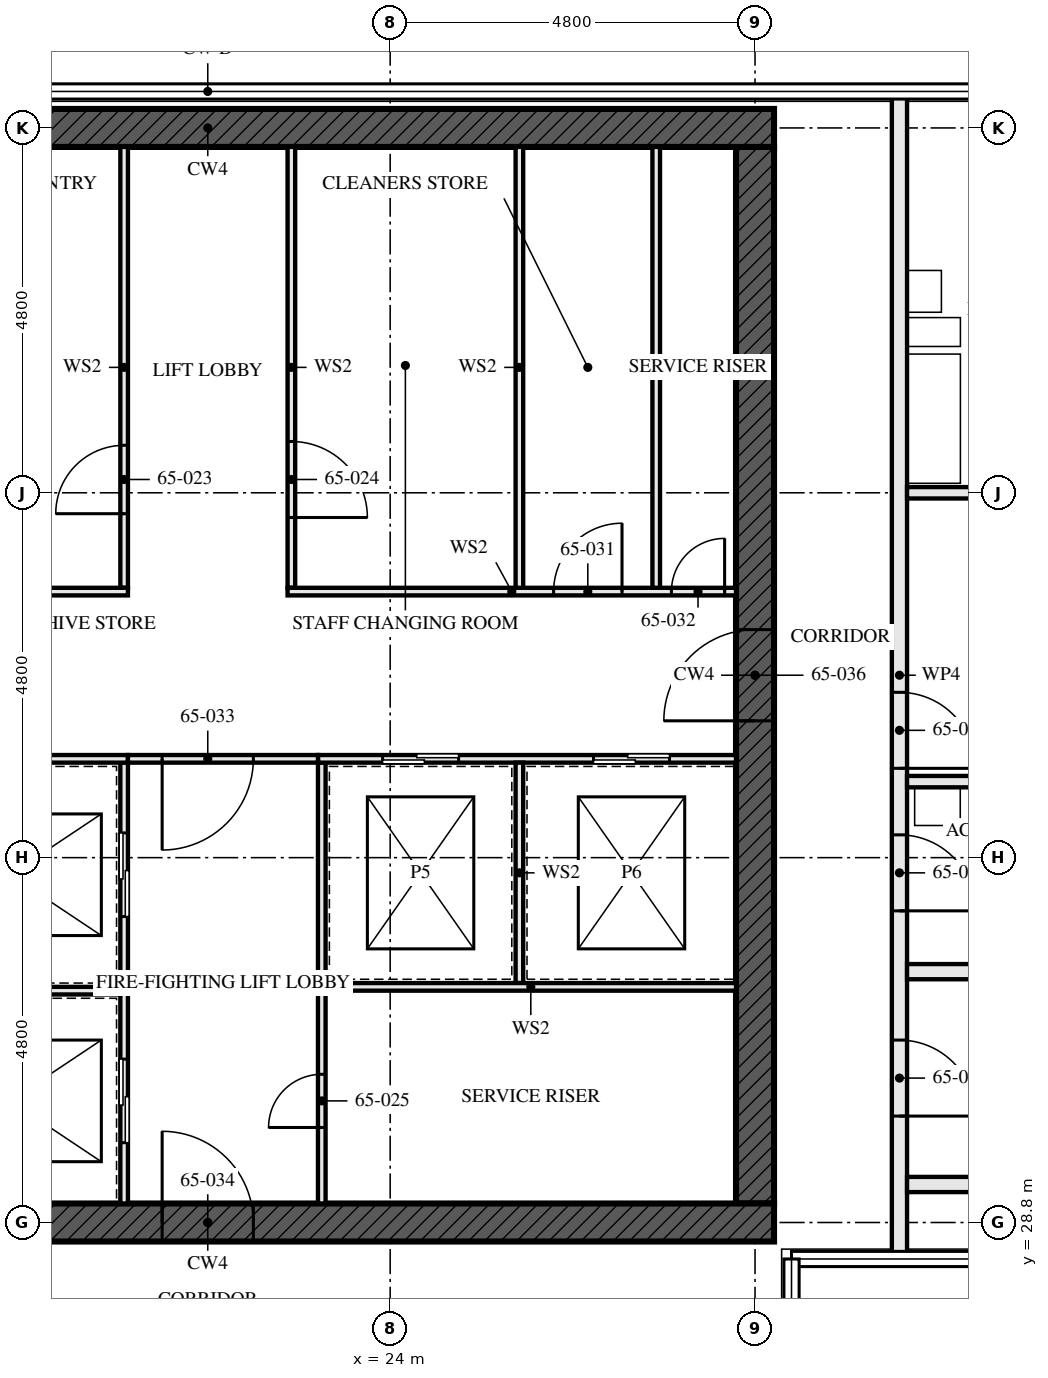
"""IFC4 building model, lengths in metres.
Left out: names, types, materials, properties, quantities, classifications, styles, units other than length and angle.
Written with IfcOpenShell. Run it as: python <this file> out.ifc"""

import sys

from ifc_helpers import new_model, si_unit, direction, frame, frame_2d, origin, place, context, subcontext, project, spatial, rectangle, extrude, element, fill, save


model = new_model("IFC4")
c1 = context("Model", 3, precision=1e-05, world=origin(), true_north=direction((0.0, 1.0)))
c2 = subcontext(c1, "Body", "Model", "MODEL_VIEW")
j1 = project(units=[si_unit("LENGTHUNIT", "METRE"), si_unit("PLANEANGLEUNIT", "RADIAN")], contexts=[c1])
p1 = place(None, origin())
s1 = spatial("IfcSite", under=j1, at=p1, CompositionType="ELEMENT")
p2 = place(p1, origin())
s2 = spatial("IfcBuilding", under=s1, at=p2, CompositionType="ELEMENT")
p3 = place(p2, frame((0.0, 0.0, 236.5)))
s3 = spatial("IfcBuildingStorey", under=s2, at=p3, CompositionType="ELEMENT", Elevation=236.5)
p4 = place(p3, frame((14.15, 28.8, -0.17), z_axis=(0.0, 0.0, 1.0), x_axis=(1.0, 0.0, 0.0)))
e1 = element("IfcWall", 1, at=p4, inside=s3, PredefinedType="SHEAR", context=c2, shape_type="SweptSolid", body=[
    extrude(rectangle(XDim=14.9, YDim=0.5, at=frame_2d((7.45, 0.0))), origin(), (0.0, 0.0, 1.0), 3.5),
])
p5 = place(p4, frame((6.85, 0.0, 0.17)))
e2 = element("IfcOpeningElement", 2, at=p5, cuts=e1, PredefinedType="OPENING", context=c2, shape_type="SweptSolid", body=[
    extrude(rectangle(XDim=1.2, YDim=2.1, at=frame_2d((0.6, 1.05))), frame((0.0, 0.26, 0.0), z_axis=(0.0, -1.0, 0.0), x_axis=(1.0, 0.0, 0.0)), (0.0, 0.0, 1.0), 0.521),
])
p6 = place(p3, frame((29.05, 43.2, -0.17), z_axis=(0.0, 0.0, 1.0), x_axis=(-1.0, 0.0, 0.0)))
e3 = element("IfcWall", 3, at=p6, inside=s3, PredefinedType="SHEAR", context=c2, shape_type="SweptSolid", body=[
    extrude(rectangle(XDim=14.9, YDim=0.5, at=frame_2d((7.45, 0.0))), origin(), (0.0, 0.0, 1.0), 3.5),
])
p7 = place(p3, frame((28.8, 29.05, -0.17), z_axis=(0.0, 0.0, 1.0), x_axis=(0.0, 1.0, 0.0)))
e4 = element("IfcWall", 4, at=p7, inside=s3, PredefinedType="SHEAR", context=c2, shape_type="SweptSolid", body=[
    extrude(rectangle(XDim=13.9, YDim=0.5, at=frame_2d((6.95, 0.0))), origin(), (0.0, 0.0, 1.0), 3.5),
])
p8 = place(p7, frame((6.35, 0.0, 0.17)))
e5 = element("IfcOpeningElement", 5, at=p8, cuts=e4, PredefinedType="OPENING", context=c2, shape_type="SweptSolid", body=[
    extrude(rectangle(XDim=1.2, YDim=2.1, at=frame_2d((0.6, 1.05))), frame((0.0, 0.26, 0.0), z_axis=(0.0, -1.0, 0.0), x_axis=(1.0, 0.0, 0.0)), (0.0, 0.0, 1.0), 0.521),
])
for number, where, z_axis, x_axis in (
    (6, (35.5, 29.3, 0.0), (0.0, 0.0, 1.0), (-1.0, 0.0, 0.0)),
    (7, (35.5, 32.1, 0.0), (0.0, 0.0, 1.0), (-1.0, 0.0, 0.0)),
):
    element("IfcWall", number, at=place(p3, frame(where, z_axis=z_axis, x_axis=x_axis)), inside=s3, PredefinedType="SOLIDWALL", context=c2, shape_type="SweptSolid", body=[
        extrude(rectangle(XDim=4.7, YDim=0.2, at=frame_2d((2.35, 0.0))), origin(), (0.0, 0.0, 1.0), 2.99),
    ])
p9 = place(p3, frame((33.8, 34.6, 0.0), z_axis=(0.0, 0.0, 1.0), x_axis=(-1.0, 0.0, 0.0)))
e8 = element("IfcWall", 8, at=p9, inside=s3, PredefinedType="PARTITIONING", context=c2, shape_type="SweptSolid", body=[
    extrude(rectangle(XDim=3.0, YDim=0.15, at=frame_2d((1.5, 0.0))), origin(), (0.0, 0.0, 1.0), 3.33),
])
p10 = place(p3, frame((33.8, 38.4, 0.0), z_axis=(0.0, 0.0, 1.0), x_axis=(-1.0, 0.0, 0.0)))
e9 = element("IfcWall", 9, at=p10, inside=s3, PredefinedType="PARTITIONING", context=c2, shape_type="SweptSolid", body=[
    extrude(rectangle(XDim=3.0, YDim=0.15, at=frame_2d((1.5, 0.0))), origin(), (0.0, 0.0, 1.0), 2.55),
])
p11 = place(p10, frame((1.05, 0.0, 0.0)))
e10 = element("IfcOpeningElement", 10, at=p11, cuts=e9, PredefinedType="OPENING", context=c2, shape_type="SweptSolid", body=[
    extrude(rectangle(XDim=0.9, YDim=2.1, at=frame_2d((0.45, 1.05))), frame((0.0, 0.085, 0.0), z_axis=(0.0, -1.0, 0.0), x_axis=(1.0, 0.0, 0.0)), (0.0, 0.0, 1.0), 0.171),
])
p12 = place(p3, frame((30.7, 28.345, 0.0), z_axis=(0.0, 0.0, 1.0), x_axis=(0.0, 1.0, 0.0)))
e11 = element("IfcWall", 11, at=p12, inside=s3, PredefinedType="PARTITIONING", context=c2, shape_type="SweptSolid", body=[
    extrude(rectangle(XDim=15.31, YDim=0.2, at=frame_2d((7.655, 0.0))), origin(), (0.0, 0.0, 1.0), 2.32),
])
p13 = place(p12, frame((1.855, 0.0, 0.0)))
e12 = element("IfcOpeningElement", 12, at=p13, cuts=e11, PredefinedType="OPENING", context=c2, shape_type="SweptSolid", body=[
    extrude(rectangle(XDim=1.0, YDim=2.1, at=frame_2d((0.5, 1.05))), frame((0.0, 0.111, 0.0), z_axis=(0.0, -1.0, 0.0), x_axis=(1.0, 0.0, 0.0)), (0.0, 0.0, 1.0), 0.221),
])
p14 = place(p12, frame((4.555, 0.0, 0.0)))
e13 = element("IfcOpeningElement", 13, at=p14, cuts=e11, PredefinedType="OPENING", context=c2, shape_type="SweptSolid", body=[
    extrude(rectangle(XDim=1.0, YDim=2.1, at=frame_2d((0.5, 1.05))), frame((0.0, 0.111, 0.0), z_axis=(0.0, -1.0, 0.0), x_axis=(1.0, 0.0, 0.0)), (0.0, 0.0, 1.0), 0.221),
])
p15 = place(p12, frame((6.43, 0.0, 0.0)))
e14 = element("IfcOpeningElement", 14, at=p15, cuts=e11, PredefinedType="OPENING", context=c2, shape_type="SweptSolid", body=[
    extrude(rectangle(XDim=1.0, YDim=2.1, at=frame_2d((0.5, 1.05))), frame((0.0, 0.111, 0.0), z_axis=(0.0, -1.0, 0.0), x_axis=(1.0, 0.0, 0.0)), (0.0, 0.0, 1.0), 0.221),
])
p16 = place(p3, frame((27.5, 37.15, 0.0), z_axis=(0.0, 0.0, 1.0), x_axis=(0.0, 1.0, 0.0)))
e15 = element("IfcWall", 15, at=p16, inside=s3, PredefinedType="SOLIDWALL", context=c2, shape_type="SweptSolid", body=[
    extrude(rectangle(XDim=5.8, YDim=0.1, at=frame_2d((2.9, 0.0))), origin(), (0.0, 0.0, 1.0), 3.33),
])
p17 = place(p3, frame((20.5, 29.05, 0.0), z_axis=(0.0, 0.0, 1.0), x_axis=(0.0, 1.0, 0.0)))
e16 = element("IfcWall", 16, at=p17, inside=s3, PredefinedType="SOLIDWALL", context=c2, shape_type="SweptSolid", body=[
    extrude(rectangle(XDim=5.8, YDim=0.1, at=frame_2d((2.9, 0.0))), origin(), (0.0, 0.0, 1.0), 3.33),
])
p18 = place(p17, frame((0.8, 0.0, 0.0)))
e17 = element("IfcOpeningElement", 17, at=p18, cuts=e16, PredefinedType="OPENING", context=c2, shape_type="SweptSolid", body=[
    extrude(rectangle(XDim=1.1, YDim=2.3, at=frame_2d((0.55, 1.15))), frame((0.0, 0.061, 0.0), z_axis=(0.0, -1.0, 0.0), x_axis=(1.0, 0.0, 0.0)), (0.0, 0.0, 1.0), 0.121),
])
p19 = place(p17, frame((3.775, 0.0, 0.0)))
e18 = element("IfcOpeningElement", 18, at=p19, cuts=e16, PredefinedType="OPENING", context=c2, shape_type="SweptSolid", body=[
    extrude(rectangle(XDim=1.1, YDim=2.3, at=frame_2d((0.55, 1.15))), frame((0.0, 0.061, 0.0), z_axis=(0.0, -1.0, 0.0), x_axis=(1.0, 0.0, 0.0)), (0.0, 0.0, 1.0), 0.121),
])
p20 = place(p3, frame((20.5, 37.15, 0.0), z_axis=(0.0, 0.0, 1.0), x_axis=(0.0, 1.0, 0.0)))
e19 = element("IfcWall", 19, at=p20, inside=s3, PredefinedType="SOLIDWALL", context=c2, shape_type="SweptSolid", body=[
    extrude(rectangle(XDim=5.8, YDim=0.1, at=frame_2d((2.9, 0.0))), origin(), (0.0, 0.0, 1.0), 3.33),
])
p21 = place(p20, frame((0.975, 0.0, 0.0)))
e20 = element("IfcOpeningElement", 20, at=p21, cuts=e19, PredefinedType="OPENING", context=c2, shape_type="SweptSolid", body=[
    extrude(rectangle(XDim=0.9, YDim=2.1, at=frame_2d((0.45, 1.05))), frame((0.0, 0.061, 0.0), z_axis=(0.0, -1.0, 0.0), x_axis=(1.0, 0.0, 0.0)), (0.0, 0.0, 1.0), 0.121),
])
p22 = place(p3, frame((22.7, 37.15, 0.0), z_axis=(0.0, 0.0, 1.0), x_axis=(0.0, 1.0, 0.0)))
e21 = element("IfcWall", 21, at=p22, inside=s3, PredefinedType="SOLIDWALL", context=c2, shape_type="SweptSolid", body=[
    extrude(rectangle(XDim=5.8, YDim=0.1, at=frame_2d((2.9, 0.0))), origin(), (0.0, 0.0, 1.0), 3.33),
])
p23 = place(p22, frame((0.925, 0.0, 0.0)))
e22 = element("IfcOpeningElement", 22, at=p23, cuts=e21, PredefinedType="OPENING", context=c2, shape_type="SweptSolid", body=[
    extrude(rectangle(XDim=1.0, YDim=2.1, at=frame_2d((0.5, 1.05))), frame((0.0, 0.061, 0.0), z_axis=(0.0, -1.0, 0.0), x_axis=(1.0, 0.0, 0.0)), (0.0, 0.0, 1.0), 0.121),
])
p24 = place(p3, frame((23.1, 29.05, 0.0), z_axis=(0.0, 0.0, 1.0), x_axis=(0.0, 1.0, 0.0)))
e23 = element("IfcWall", 23, at=p24, inside=s3, PredefinedType="SOLIDWALL", context=c2, shape_type="SweptSolid", body=[
    extrude(rectangle(XDim=5.8, YDim=0.1, at=frame_2d((2.9, 0.0))), origin(), (0.0, 0.0, 1.0), 3.33),
])
p25 = place(p24, frame((1.0, 0.0, 0.0)))
e24 = element("IfcOpeningElement", 24, at=p25, cuts=e23, PredefinedType="OPENING", context=c2, shape_type="SweptSolid", body=[
    extrude(rectangle(XDim=0.7, YDim=2.1, at=frame_2d((0.35, 1.05))), frame((0.0, 0.061, 0.0), z_axis=(0.0, -1.0, 0.0), x_axis=(1.0, 0.0, 0.0)), (0.0, 0.0, 1.0), 0.121),
])
p26 = place(p3, frame((14.65, 34.9, 0.0), z_axis=(0.0, 0.0, 1.0), x_axis=(1.0, 0.0, 0.0)))
e25 = element("IfcWall", 25, at=p26, inside=s3, PredefinedType="SOLIDWALL", context=c2, shape_type="SweptSolid", body=[
    extrude(rectangle(XDim=5.9, YDim=0.1, at=frame_2d((2.95, 0.0))), origin(), (0.0, 0.0, 1.0), 3.33),
])
p27 = place(p26, frame((1.6, 0.0, 0.0)))
e26 = element("IfcOpeningElement", 26, at=p27, cuts=e25, PredefinedType="OPENING", context=c2, shape_type="SweptSolid", body=[
    extrude(rectangle(XDim=0.7, YDim=2.1, at=frame_2d((0.35, 1.05))), frame((0.0, 0.061, 0.0), z_axis=(0.0, -1.0, 0.0), x_axis=(1.0, 0.0, 0.0)), (0.0, 0.0, 1.0), 0.121),
])
p28 = place(p3, frame((23.05, 34.9, 0.0), z_axis=(0.0, 0.0, 1.0), x_axis=(1.0, 0.0, 0.0)))
e27 = element("IfcWall", 27, at=p28, inside=s3, PredefinedType="SOLIDWALL", context=c2, shape_type="SweptSolid", body=[
    extrude(rectangle(XDim=5.5, YDim=0.1, at=frame_2d((2.75, 0.0))), origin(), (0.0, 0.0, 1.0), 3.33),
])
p29 = place(p28, frame((0.85, 0.0, 0.0)))
e28 = element("IfcOpeningElement", 28, at=p29, cuts=e27, PredefinedType="OPENING", context=c2, shape_type="SweptSolid", body=[
    extrude(rectangle(XDim=1.0, YDim=2.1, at=frame_2d((0.5, 1.05))), frame((0.0, 0.061, 0.0), z_axis=(0.0, -1.0, 0.0), x_axis=(1.0, 0.0, 0.0)), (0.0, 0.0, 1.0), 0.121),
])
p30 = place(p28, frame((3.625, 0.0, 0.0)))
e29 = element("IfcOpeningElement", 29, at=p30, cuts=e27, PredefinedType="OPENING", context=c2, shape_type="SweptSolid", body=[
    extrude(rectangle(XDim=1.0, YDim=2.1, at=frame_2d((0.5, 1.05))), frame((0.0, 0.061, 0.0), z_axis=(0.0, -1.0, 0.0), x_axis=(1.0, 0.0, 0.0)), (0.0, 0.0, 1.0), 0.121),
])
p31 = place(p3, frame((14.65, 37.1, 0.0), z_axis=(0.0, 0.0, 1.0), x_axis=(1.0, 0.0, 0.0)))
e30 = element("IfcWall", 30, at=p31, inside=s3, PredefinedType="SOLIDWALL", context=c2, shape_type="SweptSolid", body=[
    extrude(rectangle(XDim=5.9, YDim=0.1, at=frame_2d((2.95, 0.0))), origin(), (0.0, 0.0, 1.0), 3.33),
])
p32 = place(p31, frame((0.15, 0.0, 0.0)))
e31 = element("IfcOpeningElement", 31, at=p32, cuts=e30, PredefinedType="OPENING", context=c2, shape_type="SweptSolid", body=[
    extrude(rectangle(XDim=0.7, YDim=2.1, at=frame_2d((0.35, 1.05))), frame((0.0, 0.061, 0.0), z_axis=(0.0, -1.0, 0.0), x_axis=(1.0, 0.0, 0.0)), (0.0, 0.0, 1.0), 0.121),
])
p33 = place(p31, frame((1.5, 0.0, 0.0)))
e32 = element("IfcOpeningElement", 32, at=p33, cuts=e30, PredefinedType="OPENING", context=c2, shape_type="SweptSolid", body=[
    extrude(rectangle(XDim=0.9, YDim=2.1, at=frame_2d((0.45, 1.05))), frame((0.0, 0.061, 0.0), z_axis=(0.0, -1.0, 0.0), x_axis=(1.0, 0.0, 0.0)), (0.0, 0.0, 1.0), 0.121),
])
p34 = place(p3, frame((22.65, 37.1, 0.0), z_axis=(0.0, 0.0, 1.0), x_axis=(1.0, 0.0, 0.0)))
e33 = element("IfcWall", 33, at=p34, inside=s3, PredefinedType="SOLIDWALL", context=c2, shape_type="SweptSolid", body=[
    extrude(rectangle(XDim=5.9, YDim=0.1, at=frame_2d((2.95, 0.0))), origin(), (0.0, 0.0, 1.0), 3.33),
])
p35 = place(p34, frame((3.5, 0.0, 0.0)))
e34 = element("IfcOpeningElement", 34, at=p35, cuts=e33, PredefinedType="OPENING", context=c2, shape_type="SweptSolid", body=[
    extrude(rectangle(XDim=0.9, YDim=2.1, at=frame_2d((0.45, 1.05))), frame((0.0, 0.061, 0.0), z_axis=(0.0, -1.0, 0.0), x_axis=(1.0, 0.0, 0.0)), (0.0, 0.0, 1.0), 0.121),
])
p36 = place(p34, frame((5.05, 0.0, 0.0)))
e35 = element("IfcOpeningElement", 35, at=p36, cuts=e33, PredefinedType="OPENING", context=c2, shape_type="SweptSolid", body=[
    extrude(rectangle(XDim=0.7, YDim=2.1, at=frame_2d((0.35, 1.05))), frame((0.0, 0.061, 0.0), z_axis=(0.0, -1.0, 0.0), x_axis=(1.0, 0.0, 0.0)), (0.0, 0.0, 1.0), 0.121),
])
p37 = place(p3, frame((20.55, 34.9, 0.0), z_axis=(0.0, 0.0, 1.0), x_axis=(1.0, 0.0, 0.0)))
e36 = element("IfcWall", 36, at=p37, inside=s3, PredefinedType="SOLIDWALL", context=c2, shape_type="SweptSolid", body=[
    extrude(rectangle(XDim=2.5, YDim=0.1, at=frame_2d((1.25, 0.0))), origin(), (0.0, 0.0, 1.0), 3.33),
])
p38 = place(p37, frame((0.45, 0.0, 0.0)))
e37 = element("IfcOpeningElement", 37, at=p38, cuts=e36, PredefinedType="OPENING", context=c2, shape_type="SweptSolid", body=[
    extrude(rectangle(XDim=1.2, YDim=2.1, at=frame_2d((0.6, 1.05))), frame((0.0, 0.061, 0.0), z_axis=(0.0, -1.0, 0.0), x_axis=(1.0, 0.0, 0.0)), (0.0, 0.0, 1.0), 0.121),
])
p39 = place(p3, frame((17.55, 31.85, 0.0), z_axis=(0.0, 0.0, 1.0), x_axis=(1.0, 0.0, 0.0)))
e38 = element("IfcWall", 38, at=p39, inside=s3, PredefinedType="SOLIDWALL", context=c2, shape_type="SweptSolid", body=[
    extrude(rectangle(XDim=2.9, YDim=0.1, at=frame_2d((1.45, 0.0))), origin(), (0.0, 0.0, 1.0), 3.33),
])
p40 = place(p3, frame((25.7, 37.15, 0.0), z_axis=(0.0, 0.0, 1.0), x_axis=(0.0, 1.0, 0.0)))
e39 = element("IfcWall", 39, at=p40, inside=s3, PredefinedType="SOLIDWALL", context=c2, shape_type="SweptSolid", body=[
    extrude(rectangle(XDim=5.8, YDim=0.1, at=frame_2d((2.9, 0.0))), origin(), (0.0, 0.0, 1.0), 3.33),
])
p41 = place(p3, frame((25.7, 31.95, 0.0), z_axis=(0.0, 0.0, 1.0), x_axis=(0.0, 1.0, 0.0)))
e40 = element("IfcWall", 40, at=p41, inside=s3, PredefinedType="SOLIDWALL", context=c2, shape_type="SweptSolid", body=[
    extrude(rectangle(XDim=2.9, YDim=0.1, at=frame_2d((1.45, 0.0))), origin(), (0.0, 0.0, 1.0), 3.33),
])
p42 = place(p3, frame((23.15, 31.9, 0.0), z_axis=(0.0, 0.0, 1.0), x_axis=(1.0, 0.0, 0.0)))
e41 = element("IfcWall", 41, at=p42, inside=s3, PredefinedType="SOLIDWALL", context=c2, shape_type="SweptSolid", body=[
    extrude(rectangle(XDim=5.4, YDim=0.1, at=frame_2d((2.7, 0.0))), origin(), (0.0, 0.0, 1.0), 3.33),
])
p43 = place(p13, frame((1.0, 0.0, 0.0), z_axis=(0.0, 0.0, 1.0), x_axis=(-1.0, 0.0, 0.0)))
e42 = element("IfcDoor", 42, at=p43, inside=s3, OperationType="SINGLE_SWING_LEFT", PredefinedType="DOOR", context=c2, shape_type="SweptSolid", body=[
    extrude(rectangle(XDim=1.0, YDim=2.1, at=frame_2d((0.5, 1.05))), frame((0.0, 0.032, 0.0), z_axis=(0.0, -1.0, 0.0), x_axis=(1.0, 0.0, 0.0)), (0.0, 0.0, 1.0), 0.064),
])
fill(e12, e42)
p44 = place(p14, frame((1.0, 0.0, 0.0), z_axis=(0.0, 0.0, 1.0), x_axis=(-1.0, 0.0, 0.0)))
e43 = element("IfcDoor", 43, at=p44, inside=s3, OperationType="SINGLE_SWING_LEFT", PredefinedType="DOOR", context=c2, shape_type="SweptSolid", body=[
    extrude(rectangle(XDim=1.0, YDim=2.1, at=frame_2d((0.5, 1.05))), frame((0.0, 0.027, 0.0), z_axis=(0.0, -1.0, 0.0), x_axis=(1.0, 0.0, 0.0)), (0.0, 0.0, 1.0), 0.054),
])
fill(e13, e43)
p45 = place(p15, frame((1.0, 0.0, 0.0), z_axis=(0.0, 0.0, 1.0), x_axis=(-1.0, 0.0, 0.0)))
e44 = element("IfcDoor", 44, at=p45, inside=s3, OperationType="SINGLE_SWING_LEFT", PredefinedType="DOOR", context=c2, shape_type="SweptSolid", body=[
    extrude(rectangle(XDim=1.0, YDim=2.1, at=frame_2d((0.5, 1.05))), frame((0.0, 0.027, 0.0), z_axis=(0.0, -1.0, 0.0), x_axis=(1.0, 0.0, 0.0)), (0.0, 0.0, 1.0), 0.054),
])
fill(e14, e44)
p46 = place(p18, origin())
e45 = element("IfcDoor", 45, at=p46, inside=s3, OperationType="SLIDING_TO_LEFT", PredefinedType="DOOR", context=c2, shape_type="SweptSolid", body=[
    extrude(rectangle(XDim=1.1, YDim=2.3, at=frame_2d((0.55, 1.15))), frame((0.0, 0.05, 0.0), z_axis=(0.0, -1.0, 0.0), x_axis=(1.0, 0.0, 0.0)), (0.0, 0.0, 1.0), 0.1),
])
fill(e17, e45)
p47 = place(p19, origin())
e46 = element("IfcDoor", 46, at=p47, inside=s3, OperationType="SLIDING_TO_LEFT", PredefinedType="DOOR", context=c2, shape_type="SweptSolid", body=[
    extrude(rectangle(XDim=1.1, YDim=2.3, at=frame_2d((0.55, 1.15))), frame((0.0, 0.05, 0.0), z_axis=(0.0, -1.0, 0.0), x_axis=(1.0, 0.0, 0.0)), (0.0, 0.0, 1.0), 0.1),
])
fill(e18, e46)
p48 = place(p21, origin())
e47 = element("IfcDoor", 47, at=p48, inside=s3, OperationType="SINGLE_SWING_RIGHT", PredefinedType="DOOR", context=c2, shape_type="SweptSolid", body=[
    extrude(rectangle(XDim=0.9, YDim=2.1, at=frame_2d((0.45, 1.05))), frame((0.0, 0.027, 0.0), z_axis=(0.0, -1.0, 0.0), x_axis=(1.0, 0.0, 0.0)), (0.0, 0.0, 1.0), 0.054),
])
fill(e20, e47)
p49 = place(p23, frame((1.0, 0.0, 0.0), z_axis=(0.0, 0.0, 1.0), x_axis=(-1.0, 0.0, 0.0)))
e48 = element("IfcDoor", 48, at=p49, inside=s3, OperationType="SINGLE_SWING_LEFT", PredefinedType="DOOR", context=c2, shape_type="SweptSolid", body=[
    extrude(rectangle(XDim=1.0, YDim=2.1, at=frame_2d((0.5, 1.05))), frame((0.0, 0.027, 0.0), z_axis=(0.0, -1.0, 0.0), x_axis=(1.0, 0.0, 0.0)), (0.0, 0.0, 1.0), 0.054),
])
fill(e22, e48)
p50 = place(p25, origin())
e49 = element("IfcDoor", 49, at=p50, inside=s3, OperationType="SINGLE_SWING_RIGHT", PredefinedType="DOOR", context=c2, shape_type="SweptSolid", body=[
    extrude(rectangle(XDim=0.7, YDim=2.1, at=frame_2d((0.35, 1.05))), frame((0.0, 0.027, 0.0), z_axis=(0.0, -1.0, 0.0), x_axis=(1.0, 0.0, 0.0)), (0.0, 0.0, 1.0), 0.054),
])
fill(e24, e49)
p51 = place(p29, origin())
e50 = element("IfcDoor", 50, at=p51, inside=s3, OperationType="SLIDING_TO_LEFT", PredefinedType="DOOR", context=c2, shape_type="SweptSolid", body=[
    extrude(rectangle(XDim=1.0, YDim=2.1, at=frame_2d((0.5, 1.05))), frame((0.0, 0.05, 0.0), z_axis=(0.0, -1.0, 0.0), x_axis=(1.0, 0.0, 0.0)), (0.0, 0.0, 1.0), 0.1),
])
fill(e28, e50)
p52 = place(p30, origin())
e51 = element("IfcDoor", 51, at=p52, inside=s3, OperationType="SLIDING_TO_LEFT", PredefinedType="DOOR", context=c2, shape_type="SweptSolid", body=[
    extrude(rectangle(XDim=1.0, YDim=2.1, at=frame_2d((0.5, 1.05))), frame((0.0, 0.05, 0.0), z_axis=(0.0, -1.0, 0.0), x_axis=(1.0, 0.0, 0.0)), (0.0, 0.0, 1.0), 0.1),
])
fill(e29, e51)
p53 = place(p35, origin())
e52 = element("IfcDoor", 52, at=p53, inside=s3, OperationType="SINGLE_SWING_LEFT", PredefinedType="DOOR", context=c2, shape_type="SweptSolid", body=[
    extrude(rectangle(XDim=0.9, YDim=2.1, at=frame_2d((0.45, 1.05))), frame((0.0, 0.027, 0.0), z_axis=(0.0, -1.0, 0.0), x_axis=(1.0, 0.0, 0.0)), (0.0, 0.0, 1.0), 0.054),
])
fill(e34, e52)
p54 = place(p36, origin())
e53 = element("IfcDoor", 53, at=p54, inside=s3, OperationType="SINGLE_SWING_LEFT", PredefinedType="DOOR", context=c2, shape_type="SweptSolid", body=[
    extrude(rectangle(XDim=0.7, YDim=2.1, at=frame_2d((0.35, 1.05))), frame((0.0, 0.027, 0.0), z_axis=(0.0, -1.0, 0.0), x_axis=(1.0, 0.0, 0.0)), (0.0, 0.0, 1.0), 0.054),
])
fill(e35, e53)
p55 = place(p38, frame((1.2, 0.0, 0.0), z_axis=(0.0, 0.0, 1.0), x_axis=(-1.0, 0.0, 0.0)))
e54 = element("IfcDoor", 54, at=p55, inside=s3, OperationType="SINGLE_SWING_LEFT", PredefinedType="DOOR", context=c2, shape_type="SweptSolid", body=[
    extrude(rectangle(XDim=1.2, YDim=2.1, at=frame_2d((0.6, 1.05))), frame((0.0, 0.027, 0.0), z_axis=(0.0, -1.0, 0.0), x_axis=(1.0, 0.0, 0.0)), (0.0, 0.0, 1.0), 0.054),
])
fill(e37, e54)
p56 = place(p5, origin())
e55 = element("IfcDoor", 55, at=p56, inside=s3, OperationType="SINGLE_SWING_LEFT", PredefinedType="DOOR", context=c2, shape_type="SweptSolid", body=[
    extrude(rectangle(XDim=1.2, YDim=2.1, at=frame_2d((0.6, 1.05))), frame((0.0, 0.027, 0.0), z_axis=(0.0, -1.0, 0.0), x_axis=(1.0, 0.0, 0.0)), (0.0, 0.0, 1.0), 0.054),
])
fill(e2, e55)
p57 = place(p8, origin())
e56 = element("IfcDoor", 56, at=p57, inside=s3, OperationType="SINGLE_SWING_LEFT", PredefinedType="DOOR", context=c2, shape_type="SweptSolid", body=[
    extrude(rectangle(XDim=1.2, YDim=2.1, at=frame_2d((0.6, 1.05))), frame((0.0, 0.027, 0.0), z_axis=(0.0, -1.0, 0.0), x_axis=(1.0, 0.0, 0.0)), (0.0, 0.0, 1.0), 0.054),
])
fill(e5, e56)
save(model, sys.argv[1])
